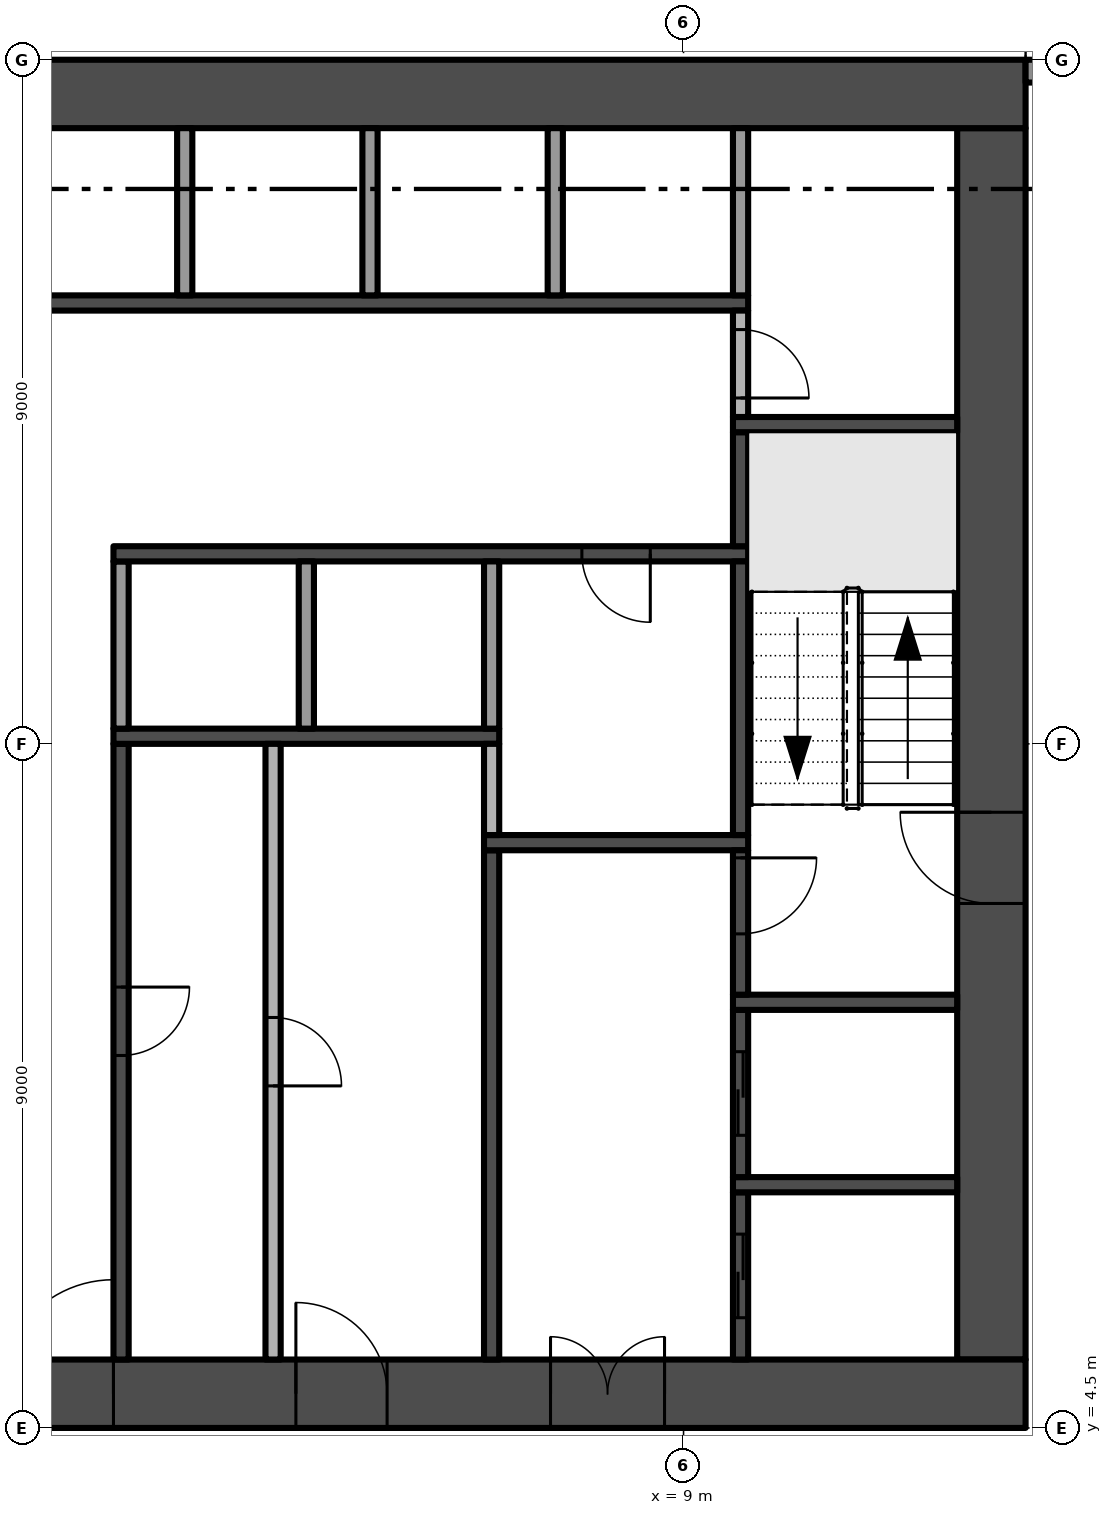
"""IFC4 building model, lengths in metres.
Left out: names, types, materials, properties, quantities, classifications, styles, units other than length and angle.
Written with IfcOpenShell. Run it as: python <this file> out.ifc"""

import sys

from ifc_helpers import new_model, si_unit, direction, frame, frame_2d, origin, place, context, subcontext, project, spatial, rectangle, extrude, element, fill, save


model = new_model("IFC4")
c1 = context("Model", 3, precision=1e-05, world=origin(), true_north=direction((0.0, 1.0)))
c2 = subcontext(c1, "Body", "Model", "MODEL_VIEW")
j1 = project(units=[si_unit("LENGTHUNIT", "METRE"), si_unit("PLANEANGLEUNIT", "RADIAN")], contexts=[c1])
p1 = place(None, origin())
s1 = spatial("IfcSite", under=j1, at=p1, CompositionType="ELEMENT")
p2 = place(p1, origin())
s2 = spatial("IfcBuilding", under=s1, at=p2, CompositionType="ELEMENT")
p3 = place(p2, frame((0.0, 0.0, 26.4)))
s3 = spatial("IfcBuildingStorey", under=s2, at=p3, CompositionType="ELEMENT", Elevation=26.4)
p4 = place(p3, frame((-13.5, 4.95, -0.3), z_axis=(0.0, 0.0, 1.0), x_axis=(1.0, 0.0, 0.0)))
e1 = element("IfcWall", 1, at=p4, inside=s3, PredefinedType="SHEAR", context=c2, shape_type="SweptSolid", body=[
    extrude(rectangle(XDim=27.0, YDim=0.9, at=frame_2d((13.5, 0.0))), origin(), (0.0, 0.0, 1.0), 3.8),
])
p5 = place(p4, frame((12.0, 0.0, 0.3)))
e2 = element("IfcOpeningElement", 2, at=p5, cuts=e1, PredefinedType="OPENING", context=c2, shape_type="SweptSolid", body=[
    extrude(rectangle(XDim=3.0, YDim=2.4, at=frame_2d((1.5, 1.2))), frame((0.0, 0.46, 0.0), z_axis=(0.0, -1.0, 0.0), x_axis=(1.0, 0.0, 0.0)), (0.0, 0.0, 1.0), 0.92),
])
p6 = place(p4, frame((4.9, 0.0, 0.3)))
e3 = element("IfcOpeningElement", 3, at=p6, cuts=e1, PredefinedType="OPENING", context=c2, shape_type="SweptSolid", body=[
    extrude(rectangle(XDim=1.2, YDim=2.2, at=frame_2d((0.6, 1.1))), frame((0.0, 0.46, 0.0), z_axis=(0.0, -1.0, 0.0), x_axis=(1.0, 0.0, 0.0)), (0.0, 0.0, 1.0), 0.92),
])
p7 = place(p4, frame((20.75, 0.0, 0.3)))
e4 = element("IfcOpeningElement", 4, at=p7, cuts=e1, PredefinedType="OPENING", context=c2, shape_type="SweptSolid", body=[
    extrude(rectangle(XDim=1.5, YDim=2.2, at=frame_2d((0.75, 1.1))), frame((0.0, 0.46, 0.0), z_axis=(0.0, -1.0, 0.0), x_axis=(1.0, 0.0, 0.0)), (0.0, 0.0, 1.0), 0.92),
])
p8 = place(p4, frame((17.4, 0.0, 0.3)))
e5 = element("IfcOpeningElement", 5, at=p8, cuts=e1, PredefinedType="OPENING", context=c2, shape_type="SweptSolid", body=[
    extrude(rectangle(XDim=1.2, YDim=2.2, at=frame_2d((0.6, 1.1))), frame((0.0, 0.46, 0.0), z_axis=(0.0, -1.0, 0.0), x_axis=(1.0, 0.0, 0.0)), (0.0, 0.0, 1.0), 0.92),
])
p9 = place(p3, frame((13.05, 5.4, -0.3), z_axis=(0.0, 0.0, 1.0), x_axis=(0.0, 1.0, 0.0)))
e6 = element("IfcWall", 6, at=p9, inside=s3, PredefinedType="SHEAR", context=c2, shape_type="SweptSolid", body=[
    extrude(rectangle(XDim=16.2, YDim=0.9, at=frame_2d((8.1, 0.0))), origin(), (0.0, 0.0, 1.0), 3.8),
])
p10 = place(p9, frame((6.0, 0.0, 0.3)))
e7 = element("IfcOpeningElement", 7, at=p10, cuts=e6, PredefinedType="OPENING", context=c2, shape_type="SweptSolid", body=[
    extrude(rectangle(XDim=1.2, YDim=2.2, at=frame_2d((0.6, 1.1))), frame((0.0, 0.46, 0.0), z_axis=(0.0, -1.0, 0.0), x_axis=(1.0, 0.0, 0.0)), (0.0, 0.0, 1.0), 0.92),
])
p11 = place(p3, frame((13.5, 22.05, -0.3), z_axis=(0.0, 0.0, 1.0), x_axis=(-1.0, 0.0, 0.0)))
e8 = element("IfcWall", 8, at=p11, inside=s3, PredefinedType="SHEAR", context=c2, shape_type="SweptSolid", body=[
    extrude(rectangle(XDim=27.0, YDim=0.9, at=frame_2d((13.5, 0.0))), origin(), (0.0, 0.0, 1.0), 3.8),
])
p12 = place(p3, frame((13.5, 22.35, 0.0), z_axis=(0.0, 0.0, 1.0), x_axis=(1.0, 0.0, 0.0)))
e9 = element("IfcWall", 9, at=p12, inside=s3, PredefinedType="SOLIDWALL", context=c2, shape_type="SweptSolid", body=[
    extrude(rectangle(XDim=3.775, YDim=0.3, at=frame_2d((1.887, 0.0))), origin(), (0.0, 0.0, 1.0), 3.5),
])
p13 = place(p12, frame((0.85, 0.0, 0.45)))
e10 = element("IfcOpeningElement", 10, at=p13, cuts=e9, PredefinedType="OPENING", context=c2, shape_type="SweptSolid", body=[
    extrude(rectangle(XDim=2.6, YDim=2.65, at=frame_2d((1.3, 1.325))), frame((0.0, 0.16, 0.0), z_axis=(0.0, -1.0, 0.0), x_axis=(1.0, 0.0, 0.0)), (0.0, 0.0, 1.0), 0.32),
])
p14 = place(p3, frame((-9.85, 19.3, 0.0), z_axis=(0.0, 0.0, 1.0), x_axis=(1.0, 0.0, 0.0)))
e11 = element("IfcWall", 11, at=p14, inside=s3, PredefinedType="SHEAR", context=c2, shape_type="SweptSolid", body=[
    extrude(rectangle(XDim=19.7, YDim=0.2, at=frame_2d((9.85, 0.0))), origin(), (0.0, 0.0, 1.0), 3.5),
])
p15 = place(p14, frame((0.769, 0.0, 0.0)))
e12 = element("IfcOpeningElement", 12, at=p15, cuts=e11, PredefinedType="OPENING", context=c2, shape_type="SweptSolid", body=[
    extrude(rectangle(XDim=1.1, YDim=2.1, at=frame_2d((0.55, 1.05))), frame((0.0, 0.11, 0.0), z_axis=(0.0, -1.0, 0.0), x_axis=(1.0, 0.0, 0.0)), (0.0, 0.0, 1.0), 0.22),
])
p16 = place(p14, frame((3.206, 0.0, 0.0)))
e13 = element("IfcOpeningElement", 13, at=p16, cuts=e11, PredefinedType="OPENING", context=c2, shape_type="SweptSolid", body=[
    extrude(rectangle(XDim=1.1, YDim=2.1, at=frame_2d((0.55, 1.05))), frame((0.0, 0.11, 0.0), z_axis=(0.0, -1.0, 0.0), x_axis=(1.0, 0.0, 0.0)), (0.0, 0.0, 1.0), 0.22),
])
p17 = place(p14, frame((5.644, 0.0, 0.0)))
e14 = element("IfcOpeningElement", 14, at=p17, cuts=e11, PredefinedType="OPENING", context=c2, shape_type="SweptSolid", body=[
    extrude(rectangle(XDim=1.1, YDim=2.1, at=frame_2d((0.55, 1.05))), frame((0.0, 0.11, 0.0), z_axis=(0.0, -1.0, 0.0), x_axis=(1.0, 0.0, 0.0)), (0.0, 0.0, 1.0), 0.22),
])
p18 = place(p14, frame((8.081, 0.0, 0.0)))
e15 = element("IfcOpeningElement", 15, at=p18, cuts=e11, PredefinedType="OPENING", context=c2, shape_type="SweptSolid", body=[
    extrude(rectangle(XDim=1.1, YDim=2.1, at=frame_2d((0.55, 1.05))), frame((0.0, 0.11, 0.0), z_axis=(0.0, -1.0, 0.0), x_axis=(1.0, 0.0, 0.0)), (0.0, 0.0, 1.0), 0.22),
])
p19 = place(p3, frame((1.6, 13.5, 0.0), z_axis=(0.0, 0.0, 1.0), x_axis=(0.0, -1.0, 0.0)))
e16 = element("IfcWall", 16, at=p19, inside=s3, PredefinedType="SHEAR", context=c2, shape_type="SweptSolid", body=[
    extrude(rectangle(XDim=8.1, YDim=0.2, at=frame_2d((4.05, 0.0))), origin(), (0.0, 0.0, 1.0), 3.5),
])
p20 = place(p19, frame((3.2, 0.0, 0.0)))
e17 = element("IfcOpeningElement", 17, at=p20, cuts=e16, PredefinedType="OPENING", context=c2, shape_type="SweptSolid", body=[
    extrude(rectangle(XDim=0.9, YDim=2.1, at=frame_2d((0.45, 1.05))), frame((0.0, 0.11, 0.0), z_axis=(0.0, -1.0, 0.0), x_axis=(1.0, 0.0, 0.0)), (0.0, 0.0, 1.0), 0.22),
])
p21 = place(p3, frame((1.5, 13.6, 0.0), z_axis=(0.0, 0.0, 1.0), x_axis=(1.0, 0.0, 0.0)))
e18 = element("IfcWall", 18, at=p21, inside=s3, PredefinedType="SHEAR", context=c2, shape_type="SweptSolid", body=[
    extrude(rectangle(XDim=5.075, YDim=0.2, at=frame_2d((2.538, 0.0))), origin(), (0.0, 0.0, 1.0), 3.5),
])
p22 = place(p3, frame((1.6, 13.7, 0.0), z_axis=(0.0, 0.0, 1.0), x_axis=(0.0, 1.0, 0.0)))
e19 = element("IfcWall", 19, at=p22, inside=s3, PredefinedType="PARTITIONING", context=c2, shape_type="SweptSolid", body=[
    extrude(rectangle(XDim=2.2, YDim=0.2, at=frame_2d((1.1, 0.0))), origin(), (0.0, 0.0, 1.0), 3.5),
])
p23 = place(p3, frame((9.85, 16.0, 0.0), z_axis=(0.0, 0.0, 1.0), x_axis=(-1.0, 0.0, 0.0)))
e20 = element("IfcWall", 20, at=p23, inside=s3, PredefinedType="SHEAR", context=c2, shape_type="SweptSolid", body=[
    extrude(rectangle(XDim=8.35, YDim=0.2, at=frame_2d((4.175, 0.0))), origin(), (0.0, 0.0, 1.0), 3.5),
])
p24 = place(p23, frame((1.288, 0.0, 0.0)))
e21 = element("IfcOpeningElement", 21, at=p24, cuts=e20, PredefinedType="OPENING", context=c2, shape_type="SweptSolid", body=[
    extrude(rectangle(XDim=0.9, YDim=2.1, at=frame_2d((0.45, 1.05))), frame((0.0, 0.11, 0.0), z_axis=(0.0, -1.0, 0.0), x_axis=(1.0, 0.0, 0.0)), (0.0, 0.0, 1.0), 0.22),
])
p25 = place(p3, frame((2.438, 19.4, 0.0), z_axis=(0.0, 0.0, 1.0), x_axis=(0.0, 1.0, 0.0)))
e22 = element("IfcWall", 22, at=p25, inside=s3, PredefinedType="PARTITIONING", context=c2, shape_type="SweptSolid", body=[
    extrude(rectangle(XDim=2.2, YDim=0.2, at=frame_2d((1.1, 0.0))), origin(), (0.0, 0.0, 1.0), 3.5),
])
p26 = place(p3, frame((3.6, 13.5, 0.0), z_axis=(0.0, 0.0, 1.0), x_axis=(0.0, -1.0, 0.0)))
e23 = element("IfcWall", 23, at=p26, inside=s3, PredefinedType="PARTITIONING", context=c2, shape_type="SweptSolid", body=[
    extrude(rectangle(XDim=8.1, YDim=0.2, at=frame_2d((4.05, 0.0))), origin(), (0.0, 0.0, 1.0), 3.5),
])
p27 = place(p26, frame((3.6, 0.0, 0.0)))
e24 = element("IfcOpeningElement", 24, at=p27, cuts=e23, PredefinedType="OPENING", context=c2, shape_type="SweptSolid", body=[
    extrude(rectangle(XDim=0.9, YDim=2.1, at=frame_2d((0.45, 1.05))), frame((0.0, 0.11, 0.0), z_axis=(0.0, -1.0, 0.0), x_axis=(1.0, 0.0, 0.0)), (0.0, 0.0, 1.0), 0.22),
])
for number, where, z_axis, x_axis in (
    (25, (4.037, 13.7, 0.0), (0.0, 0.0, 1.0), (0.0, 1.0, 0.0)),
    (26, (4.875, 19.4, 0.0), (0.0, 0.0, 1.0), (0.0, 1.0, 0.0)),
):
    element("IfcWall", number, at=place(p3, frame(where, z_axis=z_axis, x_axis=x_axis)), inside=s3, PredefinedType="PARTITIONING", context=c2, shape_type="SweptSolid", body=[
        extrude(rectangle(XDim=2.2, YDim=0.2, at=frame_2d((1.1, 0.0))), origin(), (0.0, 0.0, 1.0), 3.5),
    ])
p28 = place(p3, frame((6.475, 5.4, 0.0), z_axis=(0.0, 0.0, 1.0), x_axis=(0.0, 1.0, 0.0)))
e27 = element("IfcWall", 27, at=p28, inside=s3, PredefinedType="SHEAR", context=c2, shape_type="SweptSolid", body=[
    extrude(rectangle(XDim=6.7, YDim=0.2, at=frame_2d((3.35, 0.0))), origin(), (0.0, 0.0, 1.0), 3.5),
])
p29 = place(p3, frame((6.375, 12.2, 0.0), z_axis=(0.0, 0.0, 1.0), x_axis=(1.0, 0.0, 0.0)))
e28 = element("IfcWall", 28, at=p29, inside=s3, PredefinedType="SHEAR", context=c2, shape_type="SweptSolid", body=[
    extrude(rectangle(XDim=3.475, YDim=0.2, at=frame_2d((1.738, 0.0))), origin(), (0.0, 0.0, 1.0), 3.5),
])
p30 = place(p3, frame((6.475, 12.3, 0.0), z_axis=(0.0, 0.0, 1.0), x_axis=(0.0, 1.0, 0.0)))
e29 = element("IfcWall", 29, at=p30, inside=s3, PredefinedType="PARTITIONING", context=c2, shape_type="SweptSolid", body=[
    extrude(rectangle(XDim=1.2, YDim=0.2, at=frame_2d((0.6, 0.0))), origin(), (0.0, 0.0, 1.0), 3.5),
])
for number, where, z_axis, x_axis in (
    (30, (6.475, 13.7, 0.0), (0.0, 0.0, 1.0), (0.0, 1.0, 0.0)),
    (31, (7.312, 19.4, 0.0), (0.0, 0.0, 1.0), (0.0, 1.0, 0.0)),
):
    element("IfcWall", number, at=place(p3, frame(where, z_axis=z_axis, x_axis=x_axis)), inside=s3, PredefinedType="PARTITIONING", context=c2, shape_type="SweptSolid", body=[
        extrude(rectangle(XDim=2.2, YDim=0.2, at=frame_2d((1.1, 0.0))), origin(), (0.0, 0.0, 1.0), 3.5),
    ])
p31 = place(p3, frame((9.75, 5.4, 0.0), z_axis=(0.0, 0.0, 1.0), x_axis=(0.0, 1.0, 0.0)))
e32 = element("IfcWall", 32, at=p31, inside=s3, PredefinedType="SHEAR", context=c2, shape_type="SweptSolid", body=[
    extrude(rectangle(XDim=2.2, YDim=0.2, at=frame_2d((1.1, 0.0))), origin(), (0.0, 0.0, 1.0), 3.5),
])
p32 = place(p31, frame((0.55, 0.0, 0.0)))
e33 = element("IfcOpeningElement", 33, at=p32, cuts=e32, PredefinedType="OPENING", context=c2, shape_type="SweptSolid", body=[
    extrude(rectangle(XDim=1.1, YDim=2.1, at=frame_2d((0.55, 1.05))), frame((0.0, 0.11, 0.0), z_axis=(0.0, -1.0, 0.0), x_axis=(1.0, 0.0, 0.0)), (0.0, 0.0, 1.0), 0.22),
])
p33 = place(p3, frame((9.65, 7.7, 0.0), z_axis=(0.0, 0.0, 1.0), x_axis=(1.0, 0.0, 0.0)))
e34 = element("IfcWall", 34, at=p33, inside=s3, PredefinedType="SHEAR", context=c2, shape_type="SweptSolid", body=[
    extrude(rectangle(XDim=2.95, YDim=0.2, at=frame_2d((1.475, 0.0))), origin(), (0.0, 0.0, 1.0), 3.5),
])
p34 = place(p3, frame((9.75, 7.8, 0.0), z_axis=(0.0, 0.0, 1.0), x_axis=(0.0, 1.0, 0.0)))
e35 = element("IfcWall", 35, at=p34, inside=s3, PredefinedType="SHEAR", context=c2, shape_type="SweptSolid", body=[
    extrude(rectangle(XDim=2.2, YDim=0.2, at=frame_2d((1.1, 0.0))), origin(), (0.0, 0.0, 1.0), 3.5),
])
p35 = place(p34, frame((0.55, 0.0, 0.0)))
e36 = element("IfcOpeningElement", 36, at=p35, cuts=e35, PredefinedType="OPENING", context=c2, shape_type="SweptSolid", body=[
    extrude(rectangle(XDim=1.1, YDim=2.1, at=frame_2d((0.55, 1.05))), frame((0.0, 0.11, 0.0), z_axis=(0.0, -1.0, 0.0), x_axis=(1.0, 0.0, 0.0)), (0.0, 0.0, 1.0), 0.22),
])
p36 = place(p3, frame((9.65, 10.1, 0.0), z_axis=(0.0, 0.0, 1.0), x_axis=(1.0, 0.0, 0.0)))
e37 = element("IfcWall", 37, at=p36, inside=s3, PredefinedType="SHEAR", context=c2, shape_type="SweptSolid", body=[
    extrude(rectangle(XDim=2.95, YDim=0.2, at=frame_2d((1.475, 0.0))), origin(), (0.0, 0.0, 1.0), 3.5),
])
p37 = place(p3, frame((9.75, 12.1, 0.0), z_axis=(0.0, 0.0, 1.0), x_axis=(0.0, -1.0, 0.0)))
e38 = element("IfcWall", 38, at=p37, inside=s3, PredefinedType="SHEAR", context=c2, shape_type="SweptSolid", body=[
    extrude(rectangle(XDim=1.9, YDim=0.2, at=frame_2d((0.95, 0.0))), origin(), (0.0, 0.0, 1.0), 3.5),
])
p38 = place(p37, frame((0.1, 0.0, 0.0)))
e39 = element("IfcOpeningElement", 39, at=p38, cuts=e38, PredefinedType="OPENING", context=c2, shape_type="SweptSolid", body=[
    extrude(rectangle(XDim=1.0, YDim=2.2, at=frame_2d((0.5, 1.1))), frame((0.0, 0.11, 0.0), z_axis=(0.0, -1.0, 0.0), x_axis=(1.0, 0.0, 0.0)), (0.0, 0.0, 1.0), 0.22),
])
p39 = place(p3, frame((9.75, 12.3, 0.0), z_axis=(0.0, 0.0, 1.0), x_axis=(0.0, 1.0, 0.0)))
e40 = element("IfcWall", 40, at=p39, inside=s3, PredefinedType="SHEAR", context=c2, shape_type="SweptSolid", body=[
    extrude(rectangle(XDim=3.6, YDim=0.2, at=frame_2d((1.8, 0.0))), origin(), (0.0, 0.0, 1.0), 3.5),
])
p40 = place(p3, frame((9.75, 16.1, 0.0), z_axis=(0.0, 0.0, 1.0), x_axis=(0.0, 1.0, 0.0)))
e41 = element("IfcWall", 41, at=p40, inside=s3, PredefinedType="SHEAR", context=c2, shape_type="SweptSolid", body=[
    extrude(rectangle(XDim=1.5, YDim=0.2, at=frame_2d((0.75, 0.0))), origin(), (0.0, 0.0, 1.0), 3.5),
])
p41 = place(p3, frame((9.65, 17.7, 0.0), z_axis=(0.0, 0.0, 1.0), x_axis=(1.0, 0.0, 0.0)))
e42 = element("IfcWall", 42, at=p41, inside=s3, PredefinedType="SHEAR", context=c2, shape_type="SweptSolid", body=[
    extrude(rectangle(XDim=2.95, YDim=0.2, at=frame_2d((1.475, 0.0))), origin(), (0.0, 0.0, 1.0), 3.5),
])
p42 = place(p3, frame((9.75, 19.2, 0.0), z_axis=(0.0, 0.0, 1.0), x_axis=(0.0, -1.0, 0.0)))
e43 = element("IfcWall", 43, at=p42, inside=s3, PredefinedType="PARTITIONING", context=c2, shape_type="SweptSolid", body=[
    extrude(rectangle(XDim=1.4, YDim=0.2, at=frame_2d((0.7, 0.0))), origin(), (0.0, 0.0, 1.0), 3.5),
])
p43 = place(p42, frame((0.25, 0.0, 0.0)))
e44 = element("IfcOpeningElement", 44, at=p43, cuts=e43, PredefinedType="OPENING", context=c2, shape_type="SweptSolid", body=[
    extrude(rectangle(XDim=0.9, YDim=2.1, at=frame_2d((0.45, 1.05))), frame((0.0, 0.11, 0.0), z_axis=(0.0, -1.0, 0.0), x_axis=(1.0, 0.0, 0.0)), (0.0, 0.0, 1.0), 0.22),
])
p44 = place(p3, frame((9.75, 19.4, 0.0), z_axis=(0.0, 0.0, 1.0), x_axis=(0.0, 1.0, 0.0)))
e45 = element("IfcWall", 45, at=p44, inside=s3, PredefinedType="PARTITIONING", context=c2, shape_type="SweptSolid", body=[
    extrude(rectangle(XDim=2.2, YDim=0.2, at=frame_2d((1.1, 0.0))), origin(), (0.0, 0.0, 1.0), 3.5),
])
p45 = place(p5, frame((3.0, 0.0, 0.0), z_axis=(0.0, 0.0, 1.0), x_axis=(-1.0, 0.0, 0.0)))
e46 = element("IfcDoor", 46, at=p45, inside=s3, OperationType="DOUBLE_DOOR_SINGLE_SWING", PredefinedType="DOOR", context=c2, shape_type="SweptSolid", body=[
    extrude(rectangle(XDim=3.0, YDim=2.4, at=frame_2d((1.5, 1.2))), frame((0.0, 0.025, 0.0), z_axis=(0.0, -1.0, 0.0), x_axis=(1.0, 0.0, 0.0)), (0.0, 0.0, 1.0), 0.05),
])
fill(e2, e46)
p46 = place(p10, frame((1.2, 0.0, 0.0), z_axis=(0.0, 0.0, 1.0), x_axis=(-1.0, 0.0, 0.0)))
e47 = element("IfcDoor", 47, at=p46, inside=s3, OperationType="SINGLE_SWING_LEFT", PredefinedType="DOOR", context=c2, shape_type="SweptSolid", body=[
    extrude(rectangle(XDim=1.2, YDim=2.2, at=frame_2d((0.6, 1.1))), frame((0.0, 0.025, 0.0), z_axis=(0.0, -1.0, 0.0), x_axis=(1.0, 0.0, 0.0)), (0.0, 0.0, 1.0), 0.05),
])
fill(e7, e47)
p47 = place(p7, frame((1.5, 0.0, 0.0), z_axis=(0.0, 0.0, 1.0), x_axis=(-1.0, 0.0, 0.0)))
e48 = element("IfcDoor", 48, at=p47, inside=s3, OperationType="DOUBLE_DOOR_SINGLE_SWING", PredefinedType="DOOR", context=c2, shape_type="SweptSolid", body=[
    extrude(rectangle(XDim=1.5, YDim=2.2, at=frame_2d((0.75, 1.1))), frame((0.0, 0.025, 0.0), z_axis=(0.0, -1.0, 0.0), x_axis=(1.0, 0.0, 0.0)), (0.0, 0.0, 1.0), 0.05),
])
fill(e4, e48)
p48 = place(p8, frame((1.2, 0.0, 0.0), z_axis=(0.0, 0.0, 1.0), x_axis=(-1.0, 0.0, 0.0)))
e49 = element("IfcDoor", 49, at=p48, inside=s3, OperationType="SINGLE_SWING_RIGHT", PredefinedType="DOOR", context=c2, shape_type="SweptSolid", body=[
    extrude(rectangle(XDim=1.2, YDim=2.2, at=frame_2d((0.6, 1.1))), frame((0.0, 0.025, 0.0), z_axis=(0.0, -1.0, 0.0), x_axis=(1.0, 0.0, 0.0)), (0.0, 0.0, 1.0), 0.05),
])
fill(e5, e49)
p49 = place(p38, origin())
e50 = element("IfcDoor", 50, at=p49, inside=s3, OperationType="SINGLE_SWING_LEFT", PredefinedType="DOOR", context=c2, shape_type="SweptSolid", body=[
    extrude(rectangle(XDim=1.0, YDim=2.2, at=frame_2d((0.5, 1.1))), frame((0.0, 0.025, 0.0), z_axis=(0.0, -1.0, 0.0), x_axis=(1.0, 0.0, 0.0)), (0.0, 0.0, 1.0), 0.05),
])
fill(e39, e50)
p50 = place(p32, origin())
e51 = element("IfcDoor", 51, at=p50, inside=s3, OperationType="SLIDING_TO_RIGHT", PredefinedType="DOOR", context=c2, shape_type="SweptSolid", body=[
    extrude(rectangle(XDim=1.1, YDim=2.1, at=frame_2d((0.55, 1.05))), frame((0.0, 0.025, 0.0), z_axis=(0.0, -1.0, 0.0), x_axis=(1.0, 0.0, 0.0)), (0.0, 0.0, 1.0), 0.05),
])
fill(e33, e51)
p51 = place(p35, origin())
e52 = element("IfcDoor", 52, at=p51, inside=s3, OperationType="SLIDING_TO_RIGHT", PredefinedType="DOOR", context=c2, shape_type="SweptSolid", body=[
    extrude(rectangle(XDim=1.1, YDim=2.1, at=frame_2d((0.55, 1.05))), frame((0.0, 0.025, 0.0), z_axis=(0.0, -1.0, 0.0), x_axis=(1.0, 0.0, 0.0)), (0.0, 0.0, 1.0), 0.05),
])
fill(e36, e52)
p52 = place(p20, origin())
e53 = element("IfcDoor", 53, at=p52, inside=s3, OperationType="SINGLE_SWING_LEFT", PredefinedType="DOOR", context=c2, shape_type="SweptSolid", body=[
    extrude(rectangle(XDim=0.9, YDim=2.1, at=frame_2d((0.45, 1.05))), frame((0.0, 0.025, 0.0), z_axis=(0.0, -1.0, 0.0), x_axis=(1.0, 0.0, 0.0)), (0.0, 0.0, 1.0), 0.05),
])
fill(e17, e53)
p53 = place(p24, origin())
e54 = element("IfcDoor", 54, at=p53, inside=s3, OperationType="SINGLE_SWING_LEFT", PredefinedType="DOOR", context=c2, shape_type="SweptSolid", body=[
    extrude(rectangle(XDim=0.9, YDim=2.1, at=frame_2d((0.45, 1.05))), frame((0.0, 0.025, 0.0), z_axis=(0.0, -1.0, 0.0), x_axis=(1.0, 0.0, 0.0)), (0.0, 0.0, 1.0), 0.05),
])
fill(e21, e54)
p54 = place(p43, origin())
e55 = element("IfcDoor", 55, at=p54, inside=s3, OperationType="SINGLE_SWING_RIGHT", PredefinedType="DOOR", context=c2, shape_type="SweptSolid", body=[
    extrude(rectangle(XDim=0.9, YDim=2.1, at=frame_2d((0.45, 1.05))), frame((0.0, 0.025, 0.0), z_axis=(0.0, -1.0, 0.0), x_axis=(1.0, 0.0, 0.0)), (0.0, 0.0, 1.0), 0.05),
])
fill(e44, e55)
p55 = place(p27, origin())
e56 = element("IfcDoor", 56, at=p55, inside=s3, OperationType="SINGLE_SWING_RIGHT", PredefinedType="DOOR", context=c2, shape_type="SweptSolid", body=[
    extrude(rectangle(XDim=0.9, YDim=2.1, at=frame_2d((0.45, 1.05))), frame((0.0, 0.025, 0.0), z_axis=(0.0, -1.0, 0.0), x_axis=(1.0, 0.0, 0.0)), (0.0, 0.0, 1.0), 0.05),
])
fill(e24, e56)
save(model, sys.argv[1])
